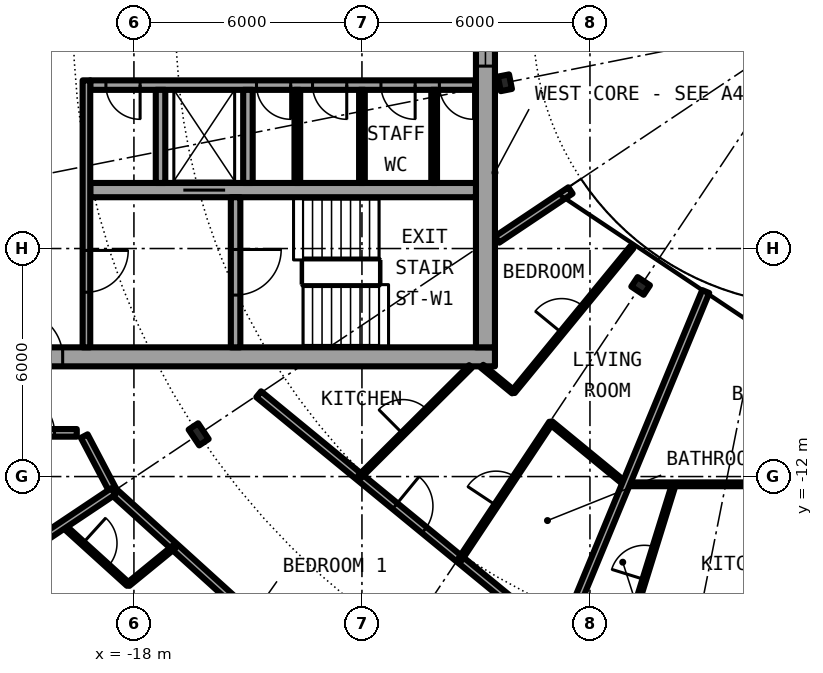
"""IFC4 building model, lengths in metres.
Left out: names, types, materials, properties, quantities, classifications, styles, units other than length and angle.
Written with IfcOpenShell. Run it as: python <this file> out.ifc"""

import sys

from ifc_helpers import new_model, si_unit, direction, frame, frame_2d, origin, origin_2d, place, context, subcontext, project, spatial, rectangle, i_section, extrude, element, fill, save


model = new_model("IFC4")
c1 = context("Model", 3, precision=1e-05, world=origin(), true_north=direction((0.0, 1.0)))
c2 = subcontext(c1, "Body", "Model", "MODEL_VIEW")
j1 = project(units=[si_unit("LENGTHUNIT", "METRE"), si_unit("PLANEANGLEUNIT", "RADIAN")], contexts=[c1])
p1 = place(None, origin())
s1 = spatial("IfcSite", under=j1, at=p1, CompositionType="ELEMENT")
p2 = place(p1, origin())
s2 = spatial("IfcBuilding", under=s1, at=p2, CompositionType="ELEMENT")
p3 = place(p2, frame((0.0, 0.0, 173.8)))
s3 = spatial("IfcBuildingStorey", under=s2, at=p3, CompositionType="ELEMENT", Elevation=173.8)
p4 = place(p3, frame((-16.297, -10.889, 0.0), z_axis=(0.0, 0.0, 1.0), x_axis=(-0.831469612303, -0.55557023302, 0.0)))
e1 = element("IfcColumn", 1, at=p4, inside=s3, PredefinedType="COLUMN", context=c2, shape_type="SweptSolid", body=[
    extrude(i_section(OverallWidth=0.3, OverallDepth=0.5, WebThickness=0.014, FlangeThickness=0.028, FilletRadius=0.027, at=origin_2d()), origin(), (0.0, 0.0, 1.0), 3.05),
])
for number, where, z_axis, x_axis in (
    (2, (-8.239, -1.639, 0.0), (0.0, 0.0, 1.0), (-0.981, -0.195, 0.0)),
    (3, (-4.667, -6.984, 0.0), (0.0, 0.0, 1.0), (-0.556, -0.831, 0.0)),
):
    element("IfcColumn", number, at=place(p3, frame(where, z_axis=z_axis, x_axis=x_axis)), inside=s3, PredefinedType="COLUMN", context=c2, shape_type="SweptSolid", body=[
        extrude(i_section(OverallWidth=0.3, OverallDepth=0.39, WebThickness=0.011, FlangeThickness=0.019, FilletRadius=0.027, at=origin_2d()), origin(), (0.0, 0.0, 1.0), 3.05),
    ])
p5 = place(p3, frame((-22.1, -8.85, 0.0), z_axis=(0.0, 0.0, 1.0), x_axis=(1.0, 0.0, 0.0)))
e4 = element("IfcWall", 4, at=p5, inside=s3, PredefinedType="SHEAR", context=c2, shape_type="SweptSolid", body=[
    extrude(rectangle(XDim=13.6, YDim=0.5, at=frame_2d((6.8, 0.0))), origin(), (0.0, 0.0, 1.0), 3.05),
])
p6 = place(p5, frame((1.025, 0.0, 0.0)))
e5 = element("IfcOpeningElement", 5, at=p6, cuts=e4, PredefinedType="OPENING", context=c2, shape_type="SweptSolid", body=[
    extrude(rectangle(XDim=1.2, YDim=2.3, at=frame_2d((0.6, 1.15))), frame((0.0, 0.26, 0.0), z_axis=(0.0, -1.0, 0.0), x_axis=(1.0, 0.0, 0.0)), (0.0, 0.0, 1.0), 0.52),
])
p7 = place(p3, frame((-8.75, 8.6, 0.0), z_axis=(0.0, 0.0, 1.0), x_axis=(0.0, -1.0, 0.0)))
e6 = element("IfcWall", 6, at=p7, inside=s3, PredefinedType="SHEAR", context=c2, shape_type="SweptSolid", body=[
    extrude(rectangle(XDim=17.2, YDim=0.5, at=frame_2d((8.6, 0.0))), origin(), (0.0, 0.0, 1.0), 3.05),
])
p8 = place(p7, frame((7.4, 0.0, 0.1)))
e7 = element("IfcOpeningElement", 7, at=p8, cuts=e6, PredefinedType="OPENING", context=c2, shape_type="SweptSolid", body=[
    extrude(rectangle(XDim=2.4, YDim=2.2, at=frame_2d((1.2, 1.1))), frame((0.0, 0.26, 0.0), z_axis=(0.0, -1.0, 0.0), x_axis=(1.0, 0.0, 0.0)), (0.0, 0.0, 1.0), 0.52),
])
p9 = place(p3, frame((-9.0, -1.7, 0.0), z_axis=(0.0, 0.0, 1.0), x_axis=(-1.0, 0.0, 0.0)))
e8 = element("IfcWall", 8, at=p9, inside=s3, PredefinedType="SHEAR", context=c2, shape_type="SweptSolid", body=[
    extrude(rectangle(XDim=10.15, YDim=0.25, at=frame_2d((5.075, 0.0))), origin(), (0.0, 0.0, 1.0), 3.05),
])
p10 = place(p9, frame((0.062, 0.0, 0.0)))
e9 = element("IfcOpeningElement", 9, at=p10, cuts=e8, PredefinedType="OPENING", context=c2, shape_type="SweptSolid", body=[
    extrude(rectangle(XDim=0.9, YDim=2.3, at=frame_2d((0.45, 1.15))), frame((0.0, 0.135, 0.0), z_axis=(0.0, -1.0, 0.0), x_axis=(1.0, 0.0, 0.0)), (0.0, 0.0, 1.0), 0.27),
])
p11 = place(p9, frame((1.6, 0.0, 0.0)))
e10 = element("IfcOpeningElement", 10, at=p11, cuts=e8, PredefinedType="OPENING", context=c2, shape_type="SweptSolid", body=[
    extrude(rectangle(XDim=0.9, YDim=2.3, at=frame_2d((0.45, 1.15))), frame((0.0, 0.135, 0.0), z_axis=(0.0, -1.0, 0.0), x_axis=(1.0, 0.0, 0.0)), (0.0, 0.0, 1.0), 0.27),
])
p12 = place(p9, frame((3.4, 0.0, 0.0)))
e11 = element("IfcOpeningElement", 11, at=p12, cuts=e8, PredefinedType="OPENING", context=c2, shape_type="SweptSolid", body=[
    extrude(rectangle(XDim=0.9, YDim=2.3, at=frame_2d((0.45, 1.15))), frame((0.0, 0.135, 0.0), z_axis=(0.0, -1.0, 0.0), x_axis=(1.0, 0.0, 0.0)), (0.0, 0.0, 1.0), 0.27),
])
p13 = place(p9, frame((4.875, 0.0, 0.0)))
e12 = element("IfcOpeningElement", 12, at=p13, cuts=e8, PredefinedType="OPENING", context=c2, shape_type="SweptSolid", body=[
    extrude(rectangle(XDim=0.9, YDim=2.3, at=frame_2d((0.45, 1.15))), frame((0.0, 0.135, 0.0), z_axis=(0.0, -1.0, 0.0), x_axis=(1.0, 0.0, 0.0)), (0.0, 0.0, 1.0), 0.27),
])
p14 = place(p9, frame((8.837, 0.0, 0.0)))
e13 = element("IfcOpeningElement", 13, at=p14, cuts=e8, PredefinedType="OPENING", context=c2, shape_type="SweptSolid", body=[
    extrude(rectangle(XDim=0.9, YDim=2.3, at=frame_2d((0.45, 1.15))), frame((0.0, 0.135, 0.0), z_axis=(0.0, -1.0, 0.0), x_axis=(1.0, 0.0, 0.0)), (0.0, 0.0, 1.0), 0.27),
])
p15 = place(p3, frame((-9.0, -4.462, 0.0), z_axis=(0.0, 0.0, 1.0), x_axis=(-1.0, 0.0, 0.0)))
e14 = element("IfcWall", 14, at=p15, inside=s3, PredefinedType="SHEAR", context=c2, shape_type="SweptSolid", body=[
    extrude(rectangle(XDim=10.15, YDim=0.375, at=frame_2d((5.075, 0.0))), origin(), (0.0, 0.0, 1.0), 3.05),
])
p16 = place(p15, frame((6.6, 0.0, 0.0)))
e15 = element("IfcOpeningElement", 15, at=p16, cuts=e14, PredefinedType="OPENING", context=c2, shape_type="SweptSolid", body=[
    extrude(rectangle(XDim=1.1, YDim=2.3, at=frame_2d((0.55, 1.15))), frame((0.0, 0.198, 0.0), z_axis=(0.0, -1.0, 0.0), x_axis=(1.0, 0.0, 0.0)), (0.0, 0.0, 1.0), 0.395),
])
p17 = place(p3, frame((-15.325, -4.65, 0.0), z_axis=(0.0, 0.0, 1.0), x_axis=(0.0, -1.0, 0.0)))
e16 = element("IfcWall", 16, at=p17, inside=s3, PredefinedType="SHEAR", context=c2, shape_type="SweptSolid", body=[
    extrude(rectangle(XDim=3.95, YDim=0.25, at=frame_2d((1.975, 0.0))), origin(), (0.0, 0.0, 1.0), 3.05),
])
p18 = place(p17, frame((1.375, 0.0, 0.0)))
e17 = element("IfcOpeningElement", 17, at=p18, cuts=e16, PredefinedType="OPENING", context=c2, shape_type="SweptSolid", body=[
    extrude(rectangle(XDim=1.2, YDim=2.3, at=frame_2d((0.6, 1.15))), frame((0.0, 0.135, 0.0), z_axis=(0.0, -1.0, 0.0), x_axis=(1.0, 0.0, 0.0)), (0.0, 0.0, 1.0), 0.27),
])
for number, where, z_axis, x_axis in (
    (18, (-15.0, -1.825, 0.0), (0.0, 0.0, 1.0), (0.0, -1.0, 0.0)),
    (19, (-17.3, -1.825, 0.0), (0.0, 0.0, 1.0), (0.0, -1.0, 0.0)),
):
    element("IfcWall", number, at=place(p3, frame(where, z_axis=z_axis, x_axis=x_axis)), inside=s3, PredefinedType="SOLIDWALL", context=c2, shape_type="SweptSolid", body=[
        extrude(rectangle(XDim=2.45, YDim=0.25, at=frame_2d((1.225, 0.0))), origin(), (0.0, 0.0, 1.0), 2.7),
    ])
p19 = place(p3, frame((-19.25, -1.575, 0.0), z_axis=(0.0, 0.0, 1.0), x_axis=(0.0, -1.0, 0.0)))
e20 = element("IfcWall", 20, at=p19, inside=s3, PredefinedType="SOLIDWALL", context=c2, shape_type="SweptSolid", body=[
    extrude(rectangle(XDim=7.025, YDim=0.2, at=frame_2d((3.513, 0.0))), origin(), (0.0, 0.0, 1.0), 2.7),
])
p20 = place(p19, frame((4.475, 0.0, 0.0)))
e21 = element("IfcOpeningElement", 21, at=p20, cuts=e20, PredefinedType="OPENING", context=c2, shape_type="SweptSolid", body=[
    extrude(rectangle(XDim=1.1, YDim=2.3, at=frame_2d((0.55, 1.15))), frame((0.0, 0.11, 0.0), z_axis=(0.0, -1.0, 0.0), x_axis=(1.0, 0.0, 0.0)), (0.0, 0.0, 1.0), 0.22),
])
for number, where, z_axis, x_axis in (
    (22, (-10.1, -1.825, 0.0), (0.0, 0.0, 1.0), (0.0, -1.0, 0.0)),
    (23, (-12.0, -1.825, 0.0), (0.0, 0.0, 1.0), (0.0, -1.0, 0.0)),
    (24, (-13.7, -1.825, 0.0), (0.0, 0.0, 1.0), (0.0, -1.0, 0.0)),
):
    element("IfcWall", number, at=place(p3, frame(where, z_axis=z_axis, x_axis=x_axis)), inside=s3, PredefinedType="PARTITIONING", context=c2, shape_type="SweptSolid", body=[
        extrude(rectangle(XDim=2.45, YDim=0.15, at=frame_2d((1.225, 0.0))), origin(), (0.0, 0.0, 1.0), 2.7),
    ])
p21 = place(p3, frame((-19.872, -13.278, 0.0), z_axis=(0.0, 0.0, 1.0), x_axis=(0.740990220108, -0.671515817911, 0.0)))
e25 = element("IfcWall", 25, at=p21, inside=s3, PredefinedType="PARTITIONING", context=c2, shape_type="SweptSolid", body=[
    extrude(rectangle(XDim=2.323, YDim=0.1, at=frame_2d((1.161, 0.0))), origin(), (0.0, 0.0, 1.0), 2.7),
])
p22 = place(p21, frame((0.711, 0.0, 0.0)))
e26 = element("IfcOpeningElement", 26, at=p22, cuts=e25, PredefinedType="OPENING", context=c2, shape_type="SweptSolid", body=[
    extrude(rectangle(XDim=0.9, YDim=2.3, at=frame_2d((0.45, 1.15))), frame((0.0, 0.06, 0.0), z_axis=(0.0, -1.0, 0.0), x_axis=(1.0, 0.0, 0.0)), (0.0, 0.0, 1.0), 0.12),
])
p23 = place(p3, frame((-19.307, -10.935, 0.0), z_axis=(0.0, 0.0, 1.0), x_axis=(0.465605550524, -0.884992356646, 0.0)))
e27 = element("IfcWall", 27, at=p23, inside=s3, PredefinedType="PARTITIONING", context=c2, shape_type="SweptSolid", body=[
    extrude(rectangle(XDim=1.643, YDim=0.2, at=frame_2d((0.821, 0.0))), origin(), (0.0, 0.0, 1.0), 2.7),
])
p24 = place(p3, frame((-18.542, -12.389, 0.0), z_axis=(0.0, 0.0, 1.0), x_axis=(0.740947367223, -0.671563101283, 0.0)))
e28 = element("IfcWall", 28, at=p24, inside=s3, PredefinedType="PARTITIONING", context=c2, shape_type="SweptSolid", body=[
    extrude(rectangle(XDim=10.837, YDim=0.2, at=frame_2d((5.419, 0.0))), origin(), (0.0, 0.0, 1.0), 2.7),
])
p25 = place(p24, frame((6.002, 0.0, 0.0)))
e29 = element("IfcOpeningElement", 29, at=p25, cuts=e28, PredefinedType="OPENING", context=c2, shape_type="SweptSolid", body=[
    extrude(rectangle(XDim=1.0, YDim=2.3, at=frame_2d((0.5, 1.15))), frame((0.0, 0.11, 0.0), z_axis=(0.0, -1.0, 0.0), x_axis=(1.0, 0.0, 0.0)), (0.0, 0.0, 1.0), 0.22),
])
p26 = place(p3, frame((-14.717, -9.834, 0.0), z_axis=(0.0, 0.0, 1.0), x_axis=(0.773034536097, -0.634363938131, 0.0)))
e30 = element("IfcWall", 30, at=p26, inside=s3, PredefinedType="PARTITIONING", context=c2, shape_type="SweptSolid", body=[
    extrude(rectangle(XDim=10.277, YDim=0.2, at=frame_2d((5.138, 0.0))), origin(), (0.0, 0.0, 1.0), 2.7),
])
p27 = place(p26, frame((4.638, 0.0, 0.0)))
e31 = element("IfcOpeningElement", 31, at=p27, cuts=e30, PredefinedType="OPENING", context=c2, shape_type="SweptSolid", body=[
    extrude(rectangle(XDim=1.0, YDim=2.3, at=frame_2d((0.5, 1.15))), frame((0.0, 0.11, 0.0), z_axis=(0.0, -1.0, 0.0), x_axis=(1.0, 0.0, 0.0)), (0.0, 0.0, 1.0), 0.22),
])
p28 = place(p3, frame((-8.839, -9.098, 0.0), z_axis=(0.0, 0.0, 1.0), x_axis=(0.7731800648, -0.634186555673, 0.0)))
e32 = element("IfcWall", 32, at=p28, inside=s3, PredefinedType="PARTITIONING", context=c2, shape_type="SweptSolid", body=[
    extrude(rectangle(XDim=1.064, YDim=0.1, at=frame_2d((0.532, 0.0))), origin(), (0.0, 0.0, 1.0), 2.7),
])
p29 = place(p3, frame((-7.031, -10.582, 0.0), z_axis=(0.0, 0.0, 1.0), x_axis=(0.772943675046, -0.634474645046, 0.0)))
e33 = element("IfcWall", 33, at=p29, inside=s3, PredefinedType="PARTITIONING", context=c2, shape_type="SweptSolid", body=[
    extrude(rectangle(XDim=2.557, YDim=0.1, at=frame_2d((1.278, 0.0))), origin(), (0.0, 0.0, 1.0), 2.7),
])
p30 = place(p3, frame((-5.055, -12.204, 0.0), z_axis=(0.0, 0.0, 1.0), x_axis=(1.0, 0.0, 0.0)))
e34 = element("IfcWall", 34, at=p30, inside=s3, PredefinedType="PARTITIONING", context=c2, shape_type="SweptSolid", body=[
    extrude(rectangle(XDim=6.319, YDim=0.1, at=frame_2d((3.159, 0.0))), origin(), (0.0, 0.0, 1.0), 2.7),
])
p31 = place(p3, frame((-21.675, -10.85, 0.0), z_axis=(0.0, 0.0, 1.0), x_axis=(1.0, 0.0, 0.0)))
e35 = element("IfcWall", 35, at=p31, inside=s3, PredefinedType="PARTITIONING", context=c2, shape_type="SweptSolid", body=[
    extrude(rectangle(XDim=2.171, YDim=0.2, at=frame_2d((1.085, 0.0))), origin(), (0.0, 0.0, 1.0), 2.7),
])
p32 = place(p31, frame((0.585, 0.0, 0.0)))
e36 = element("IfcOpeningElement", 36, at=p32, cuts=e35, PredefinedType="OPENING", context=c2, shape_type="SweptSolid", body=[
    extrude(rectangle(XDim=1.0, YDim=2.3, at=frame_2d((0.5, 1.15))), frame((0.0, 0.11, 0.0), z_axis=(0.0, -1.0, 0.0), x_axis=(1.0, 0.0, 0.0)), (0.0, 0.0, 1.0), 0.22),
])
p33 = place(p3, frame((-6.513, -4.472, 0.0), z_axis=(0.0, 0.0, 1.0), x_axis=(-0.83133816625, -0.555766905579, 0.0)))
e37 = element("IfcWall", 37, at=p33, inside=s3, PredefinedType="PARTITIONING", context=c2, shape_type="SweptSolid", body=[
    extrude(rectangle(XDim=2.323, YDim=0.2, at=frame_2d((1.162, 0.0))), origin(), (0.0, 0.0, 1.0), 2.7),
])
p34 = place(p3, frame((-22.595, -15.098, 0.0), z_axis=(0.0, 0.0, 1.0), x_axis=(0.831387096605, 0.55569370664, 0.0)))
e38 = element("IfcWall", 38, at=p34, inside=s3, PredefinedType="PARTITIONING", context=c2, shape_type="SweptSolid", body=[
    extrude(rectangle(XDim=4.875, YDim=0.2, at=frame_2d((2.438, 0.0))), origin(), (0.0, 0.0, 1.0), 2.7),
])
p35 = place(p3, frame((-18.151, -14.838, 0.0), z_axis=(0.0, 0.0, 1.0), x_axis=(0.774283039722, 0.632839453889, 0.0)))
e39 = element("IfcWall", 39, at=p35, inside=s3, PredefinedType="PARTITIONING", context=c2, shape_type="SweptSolid", body=[
    extrude(rectangle(XDim=1.569, YDim=0.1, at=frame_2d((0.785, 0.0))), origin(), (0.0, 0.0, 1.0), 2.7),
])
p36 = place(p3, frame((-12.065, -12.011, 0.0), z_axis=(0.0, 0.0, 1.0), x_axis=(0.708793214553, 0.705416316088, 0.0)))
e40 = element("IfcWall", 40, at=p36, inside=s3, PredefinedType="PARTITIONING", context=c2, shape_type="SweptSolid", body=[
    extrude(rectangle(XDim=4.121, YDim=0.1, at=frame_2d((2.061, 0.0))), origin(), (0.0, 0.0, 1.0), 2.7),
])
p37 = place(p36, frame((1.611, 0.0, 0.0)))
e41 = element("IfcOpeningElement", 41, at=p37, cuts=e40, PredefinedType="OPENING", context=c2, shape_type="SweptSolid", body=[
    extrude(rectangle(XDim=0.9, YDim=2.3, at=frame_2d((0.45, 1.15))), frame((0.0, 0.06, 0.0), z_axis=(0.0, -1.0, 0.0), x_axis=(1.0, 0.0, 0.0)), (0.0, 0.0, 1.0), 0.12),
])
p38 = place(p3, frame((-9.418, -14.182, 0.0), z_axis=(0.0, 0.0, 1.0), x_axis=(0.553303732327, 0.832979579457, 0.0)))
e42 = element("IfcWall", 42, at=p38, inside=s3, PredefinedType="PARTITIONING", context=c2, shape_type="SweptSolid", body=[
    extrude(rectangle(XDim=4.319, YDim=0.1, at=frame_2d((2.16, 0.0))), origin(), (0.0, 0.0, 1.0), 2.7),
])
p39 = place(p38, frame((1.71, 0.0, 0.0)))
e43 = element("IfcOpeningElement", 43, at=p39, cuts=e42, PredefinedType="OPENING", context=c2, shape_type="SweptSolid", body=[
    extrude(rectangle(XDim=0.9, YDim=2.3, at=frame_2d((0.45, 1.15))), frame((0.0, 0.06, 0.0), z_axis=(0.0, -1.0, 0.0), x_axis=(1.0, 0.0, 0.0)), (0.0, 0.0, 1.0), 0.12),
])
p40 = place(p3, frame((-8.019, -9.771, 0.0), z_axis=(0.0, 0.0, 1.0), x_axis=(0.634401778971, 0.773003481776, 0.0)))
e44 = element("IfcWall", 44, at=p40, inside=s3, PredefinedType="PARTITIONING", context=c2, shape_type="SweptSolid", body=[
    extrude(rectangle(XDim=4.92, YDim=0.1, at=frame_2d((2.46, 0.0))), origin(), (0.0, 0.0, 1.0), 2.7),
])
p41 = place(p40, frame((2.01, 0.0, 0.0)))
e45 = element("IfcOpeningElement", 45, at=p41, cuts=e44, PredefinedType="OPENING", context=c2, shape_type="SweptSolid", body=[
    extrude(rectangle(XDim=0.9, YDim=2.3, at=frame_2d((0.45, 1.15))), frame((0.0, 0.06, 0.0), z_axis=(0.0, -1.0, 0.0), x_axis=(1.0, 0.0, 0.0)), (0.0, 0.0, 1.0), 0.12),
])
p42 = place(p3, frame((-6.773, -16.353, 0.0), z_axis=(0.0, 0.0, 1.0), x_axis=(0.382632652025, 0.923900564782, 0.0)))
e46 = element("IfcWall", 46, at=p42, inside=s3, PredefinedType="PARTITIONING", context=c2, shape_type="SweptSolid", body=[
    extrude(rectangle(XDim=9.98, YDim=0.2, at=frame_2d((4.99, 0.0))), origin(), (0.0, 0.0, 1.0), 2.7),
])
p43 = place(p3, frame((-5.08, -16.353, 0.0), z_axis=(0.0, 0.0, 1.0), x_axis=(0.29670674532, 0.954968642041, 0.0)))
e47 = element("IfcWall", 47, at=p43, inside=s3, PredefinedType="PARTITIONING", context=c2, shape_type="SweptSolid", body=[
    extrude(rectangle(XDim=4.344, YDim=0.1, at=frame_2d((2.172, 0.0))), origin(), (0.0, 0.0, 1.0), 2.7),
])
p44 = place(p43, frame((1.722, 0.0, 0.0)))
e48 = element("IfcOpeningElement", 48, at=p44, cuts=e47, PredefinedType="OPENING", context=c2, shape_type="SweptSolid", body=[
    extrude(rectangle(XDim=0.9, YDim=2.3, at=frame_2d((0.45, 1.15))), frame((0.0, 0.06, 0.0), z_axis=(0.0, -1.0, 0.0), x_axis=(1.0, 0.0, 0.0)), (0.0, 0.0, 1.0), 0.12),
])
p45 = place(p16, origin())
e49 = element("IfcDoor", 49, at=p45, inside=s3, OperationType="DOUBLE_DOOR_SLIDING", PredefinedType="DOOR", context=c2, shape_type="SweptSolid", body=[
    extrude(rectangle(XDim=1.1, YDim=2.3, at=frame_2d((0.55, 1.15))), frame((0.0, 0.025, 0.0), z_axis=(0.0, -1.0, 0.0), x_axis=(1.0, 0.0, 0.0)), (0.0, 0.0, 1.0), 0.05),
])
fill(e15, e49)
p46 = place(p10, origin())
e50 = element("IfcDoor", 50, at=p46, inside=s3, OperationType="SINGLE_SWING_RIGHT", PredefinedType="DOOR", context=c2, shape_type="SweptSolid", body=[
    extrude(rectangle(XDim=0.9, YDim=2.3, at=frame_2d((0.45, 1.15))), frame((0.0, 0.025, 0.0), z_axis=(0.0, -1.0, 0.0), x_axis=(1.0, 0.0, 0.0)), (0.0, 0.0, 1.0), 0.05),
])
fill(e9, e50)
p47 = place(p11, origin())
e51 = element("IfcDoor", 51, at=p47, inside=s3, OperationType="SINGLE_SWING_RIGHT", PredefinedType="DOOR", context=c2, shape_type="SweptSolid", body=[
    extrude(rectangle(XDim=0.9, YDim=2.3, at=frame_2d((0.45, 1.15))), frame((0.0, 0.025, 0.0), z_axis=(0.0, -1.0, 0.0), x_axis=(1.0, 0.0, 0.0)), (0.0, 0.0, 1.0), 0.05),
])
fill(e10, e51)
p48 = place(p12, origin())
e52 = element("IfcDoor", 52, at=p48, inside=s3, OperationType="SINGLE_SWING_RIGHT", PredefinedType="DOOR", context=c2, shape_type="SweptSolid", body=[
    extrude(rectangle(XDim=0.9, YDim=2.3, at=frame_2d((0.45, 1.15))), frame((0.0, 0.025, 0.0), z_axis=(0.0, -1.0, 0.0), x_axis=(1.0, 0.0, 0.0)), (0.0, 0.0, 1.0), 0.05),
])
fill(e11, e52)
p49 = place(p13, origin())
e53 = element("IfcDoor", 53, at=p49, inside=s3, OperationType="SINGLE_SWING_LEFT", PredefinedType="DOOR", context=c2, shape_type="SweptSolid", body=[
    extrude(rectangle(XDim=0.9, YDim=2.3, at=frame_2d((0.45, 1.15))), frame((0.0, 0.025, 0.0), z_axis=(0.0, -1.0, 0.0), x_axis=(1.0, 0.0, 0.0)), (0.0, 0.0, 1.0), 0.05),
])
fill(e12, e53)
p50 = place(p14, origin())
e54 = element("IfcDoor", 54, at=p50, inside=s3, OperationType="SINGLE_SWING_LEFT", PredefinedType="DOOR", context=c2, shape_type="SweptSolid", body=[
    extrude(rectangle(XDim=0.9, YDim=2.3, at=frame_2d((0.45, 1.15))), frame((0.0, 0.025, 0.0), z_axis=(0.0, -1.0, 0.0), x_axis=(1.0, 0.0, 0.0)), (0.0, 0.0, 1.0), 0.05),
])
fill(e13, e54)
p51 = place(p18, origin())
e55 = element("IfcDoor", 55, at=p51, inside=s3, OperationType="SINGLE_SWING_LEFT", PredefinedType="DOOR", context=c2, shape_type="SweptSolid", body=[
    extrude(rectangle(XDim=1.2, YDim=2.3, at=frame_2d((0.6, 1.15))), frame((0.0, 0.025, 0.0), z_axis=(0.0, -1.0, 0.0), x_axis=(1.0, 0.0, 0.0)), (0.0, 0.0, 1.0), 0.05),
])
fill(e17, e55)
p52 = place(p20, origin())
e56 = element("IfcDoor", 56, at=p52, inside=s3, OperationType="SINGLE_SWING_LEFT", PredefinedType="DOOR", context=c2, shape_type="SweptSolid", body=[
    extrude(rectangle(XDim=1.1, YDim=2.3, at=frame_2d((0.55, 1.15))), frame((0.0, 0.025, 0.0), z_axis=(0.0, -1.0, 0.0), x_axis=(1.0, 0.0, 0.0)), (0.0, 0.0, 1.0), 0.05),
])
fill(e21, e56)
p53 = place(p6, origin())
e57 = element("IfcDoor", 57, at=p53, inside=s3, OperationType="SINGLE_SWING_RIGHT", PredefinedType="DOOR", context=c2, shape_type="SweptSolid", body=[
    extrude(rectangle(XDim=1.2, YDim=2.3, at=frame_2d((0.6, 1.15))), frame((0.0, 0.025, 0.0), z_axis=(0.0, -1.0, 0.0), x_axis=(1.0, 0.0, 0.0)), (0.0, 0.0, 1.0), 0.05),
])
fill(e5, e57)
p54 = place(p8, origin())
e58 = element("IfcWindow", 58, at=p54, inside=s3, PartitioningType="SINGLE_PANEL", PredefinedType="WINDOW", context=c2, shape_type="SweptSolid", body=[
    extrude(rectangle(XDim=2.4, YDim=2.2, at=frame_2d((1.2, 1.1))), frame((0.0, 0.03, 0.0), z_axis=(0.0, -1.0, 0.0), x_axis=(1.0, 0.0, 0.0)), (0.0, 0.0, 1.0), 0.06),
])
fill(e7, e58)
p55 = place(p22, origin())
e59 = element("IfcDoor", 59, at=p55, inside=s3, OperationType="SINGLE_SWING_RIGHT", PredefinedType="DOOR", context=c2, shape_type="SweptSolid", body=[
    extrude(rectangle(XDim=0.9, YDim=2.3, at=frame_2d((0.45, 1.15))), frame((0.0, 0.025, 0.0), z_axis=(0.0, -1.0, 0.0), x_axis=(1.0, 0.0, 0.0)), (0.0, 0.0, 1.0), 0.05),
])
fill(e26, e59)
p56 = place(p27, origin())
e60 = element("IfcDoor", 60, at=p56, inside=s3, OperationType="SINGLE_SWING_LEFT", PredefinedType="DOOR", context=c2, shape_type="SweptSolid", body=[
    extrude(rectangle(XDim=1.0, YDim=2.3, at=frame_2d((0.5, 1.15))), frame((0.0, 0.025, 0.0), z_axis=(0.0, -1.0, 0.0), x_axis=(1.0, 0.0, 0.0)), (0.0, 0.0, 1.0), 0.05),
])
fill(e31, e60)
p57 = place(p39, origin())
e61 = element("IfcDoor", 61, at=p57, inside=s3, OperationType="SINGLE_SWING_RIGHT", PredefinedType="DOOR", context=c2, shape_type="SweptSolid", body=[
    extrude(rectangle(XDim=0.9, YDim=2.3, at=frame_2d((0.45, 1.15))), frame((0.0, 0.025, 0.0), z_axis=(0.0, -1.0, 0.0), x_axis=(1.0, 0.0, 0.0)), (0.0, 0.0, 1.0), 0.05),
])
fill(e43, e61)
p58 = place(p37, origin())
e62 = element("IfcDoor", 62, at=p58, inside=s3, OperationType="SINGLE_SWING_LEFT", PredefinedType="DOOR", context=c2, shape_type="SweptSolid", body=[
    extrude(rectangle(XDim=0.9, YDim=2.3, at=frame_2d((0.45, 1.15))), frame((0.0, 0.025, 0.0), z_axis=(0.0, -1.0, 0.0), x_axis=(1.0, 0.0, 0.0)), (0.0, 0.0, 1.0), 0.05),
])
fill(e41, e62)
p59 = place(p41, origin())
e63 = element("IfcDoor", 63, at=p59, inside=s3, OperationType="SINGLE_SWING_LEFT", PredefinedType="DOOR", context=c2, shape_type="SweptSolid", body=[
    extrude(rectangle(XDim=0.9, YDim=2.3, at=frame_2d((0.45, 1.15))), frame((0.0, 0.025, 0.0), z_axis=(0.0, -1.0, 0.0), x_axis=(1.0, 0.0, 0.0)), (0.0, 0.0, 1.0), 0.05),
])
fill(e45, e63)
p60 = place(p44, origin())
e64 = element("IfcDoor", 64, at=p60, inside=s3, OperationType="SINGLE_SWING_LEFT", PredefinedType="DOOR", context=c2, shape_type="SweptSolid", body=[
    extrude(rectangle(XDim=0.9, YDim=2.3, at=frame_2d((0.45, 1.15))), frame((0.0, 0.025, 0.0), z_axis=(0.0, -1.0, 0.0), x_axis=(1.0, 0.0, 0.0)), (0.0, 0.0, 1.0), 0.05),
])
fill(e48, e64)
p61 = place(p32, origin())
e65 = element("IfcDoor", 65, at=p61, inside=s3, OperationType="SINGLE_SWING_LEFT", PredefinedType="DOOR", context=c2, shape_type="SweptSolid", body=[
    extrude(rectangle(XDim=1.0, YDim=2.3, at=frame_2d((0.5, 1.15))), frame((0.0, 0.025, 0.0), z_axis=(0.0, -1.0, 0.0), x_axis=(1.0, 0.0, 0.0)), (0.0, 0.0, 1.0), 0.05),
])
fill(e36, e65)
save(model, sys.argv[1])
